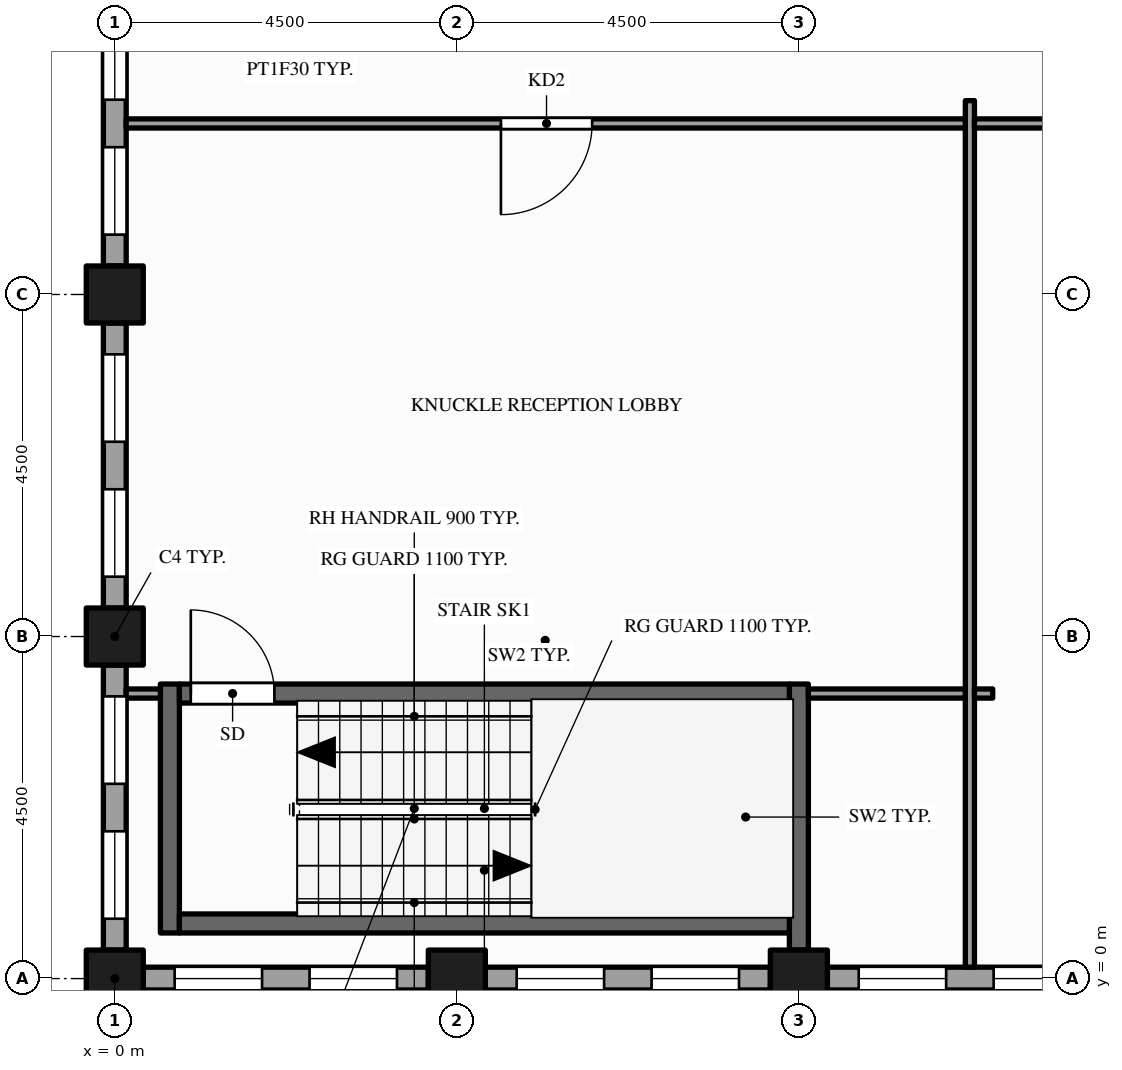
"""IFC4 building model, lengths in metres.
Left out: names, types, materials, properties, quantities, classifications, styles, units other than length and angle.
Written with IfcOpenShell. Run it as: python <this file> out.ifc"""

import sys

from ifc_helpers import new_model, si_unit, direction, frame, frame_2d, origin, origin_2d, place, context, subcontext, project, spatial, rectangle, hollow_rectangle, extrude, element, fill, save


model = new_model("IFC4")
c1 = context("Model", 3, precision=1e-05, world=origin(), true_north=direction((0.0, 1.0)))
c2 = subcontext(c1, "Body", "Model", "MODEL_VIEW")
j1 = project(units=[si_unit("LENGTHUNIT", "METRE"), si_unit("PLANEANGLEUNIT", "RADIAN")], contexts=[c1])
p1 = place(None, origin())
s1 = spatial("IfcSite", under=j1, at=p1, CompositionType="ELEMENT")
p2 = place(p1, origin())
s2 = spatial("IfcBuilding", under=s1, at=p2, CompositionType="ELEMENT")
p3 = place(p2, frame((0.0, 0.0, 239.0)))
s3 = spatial("IfcBuildingStorey", under=s2, at=p3, CompositionType="ELEMENT", Elevation=239.0)
for number, where, z_axis, x_axis in (
    (1, (0.0, 0.0, -0.15), (0.0, 0.0, 1.0), (1.0, 0.0, 0.0)),
    (2, (0.0, 4.5, -0.15), (0.0, 0.0, 1.0), (1.0, 0.0, 0.0)),
    (3, (0.0, 9.0, -0.15), (0.0, 0.0, 1.0), (1.0, 0.0, 0.0)),
    (4, (4.5, 0.0, -0.15), (0.0, 0.0, 1.0), (1.0, 0.0, 0.0)),
    (5, (9.0, 0.0, -0.15), (0.0, 0.0, 1.0), (1.0, 0.0, 0.0)),
):
    element("IfcColumn", number, at=place(p3, frame(where, z_axis=z_axis, x_axis=x_axis)), inside=s3, PredefinedType="COLUMN", context=c2, shape_type="SweptSolid", body=[
        extrude(hollow_rectangle(XDim=0.75, YDim=0.75, WallThickness=0.036, at=origin_2d()), origin(), (0.0, 0.0, 1.0), 3.9),
    ])
p4 = place(p3, frame((0.0, 13.125, 0.0), z_axis=(0.0, 0.0, 1.0), x_axis=(0.0, -1.0, 0.0)))
e6 = element("IfcWall", 6, at=p4, inside=s3, PredefinedType="STANDARD", context=c2, shape_type="SweptSolid", body=[
    extrude(rectangle(XDim=3.75, YDim=0.3, at=frame_2d((1.875, 0.0))), origin(), (0.0, 0.0, 1.0), 3.057),
])
p5 = place(p4, frame((0.413, 0.0, 0.9)))
e7 = element("IfcOpeningElement", 7, at=p5, cuts=e6, PredefinedType="OPENING", context=c2, shape_type="SweptSolid", body=[
    extrude(rectangle(XDim=1.15, YDim=2.0, at=frame_2d((0.575, 1.0))), frame((0.0, 0.16, 0.0), z_axis=(0.0, -1.0, 0.0), x_axis=(1.0, 0.0, 0.0)), (0.0, 0.0, 1.0), 0.32),
])
p6 = place(p4, frame((2.188, 0.0, 0.9)))
e8 = element("IfcOpeningElement", 8, at=p6, cuts=e6, PredefinedType="OPENING", context=c2, shape_type="SweptSolid", body=[
    extrude(rectangle(XDim=1.15, YDim=2.0, at=frame_2d((0.575, 1.0))), frame((0.0, 0.16, 0.0), z_axis=(0.0, -1.0, 0.0), x_axis=(1.0, 0.0, 0.0)), (0.0, 0.0, 1.0), 0.32),
])
p7 = place(p3, frame((0.0, 8.625, 0.0), z_axis=(0.0, 0.0, 1.0), x_axis=(0.0, -1.0, 0.0)))
e9 = element("IfcWall", 9, at=p7, inside=s3, PredefinedType="STANDARD", context=c2, shape_type="SweptSolid", body=[
    extrude(rectangle(XDim=3.75, YDim=0.3, at=frame_2d((1.875, 0.0))), origin(), (0.0, 0.0, 1.0), 3.057),
])
p8 = place(p7, frame((0.413, 0.0, 0.9)))
e10 = element("IfcOpeningElement", 10, at=p8, cuts=e9, PredefinedType="OPENING", context=c2, shape_type="SweptSolid", body=[
    extrude(rectangle(XDim=1.15, YDim=2.0, at=frame_2d((0.575, 1.0))), frame((0.0, 0.16, 0.0), z_axis=(0.0, -1.0, 0.0), x_axis=(1.0, 0.0, 0.0)), (0.0, 0.0, 1.0), 0.32),
])
p9 = place(p7, frame((2.188, 0.0, 0.9)))
e11 = element("IfcOpeningElement", 11, at=p9, cuts=e9, PredefinedType="OPENING", context=c2, shape_type="SweptSolid", body=[
    extrude(rectangle(XDim=1.15, YDim=2.0, at=frame_2d((0.575, 1.0))), frame((0.0, 0.16, 0.0), z_axis=(0.0, -1.0, 0.0), x_axis=(1.0, 0.0, 0.0)), (0.0, 0.0, 1.0), 0.32),
])
p10 = place(p3, frame((0.0, 4.125, 0.0), z_axis=(0.0, 0.0, 1.0), x_axis=(0.0, -1.0, 0.0)))
e12 = element("IfcWall", 12, at=p10, inside=s3, PredefinedType="STANDARD", context=c2, shape_type="SweptSolid", body=[
    extrude(rectangle(XDim=3.75, YDim=0.3, at=frame_2d((1.875, 0.0))), origin(), (0.0, 0.0, 1.0), 3.057),
])
p11 = place(p10, frame((0.413, 0.0, 0.9)))
e13 = element("IfcOpeningElement", 13, at=p11, cuts=e12, PredefinedType="OPENING", context=c2, shape_type="SweptSolid", body=[
    extrude(rectangle(XDim=1.15, YDim=2.0, at=frame_2d((0.575, 1.0))), frame((0.0, 0.16, 0.0), z_axis=(0.0, -1.0, 0.0), x_axis=(1.0, 0.0, 0.0)), (0.0, 0.0, 1.0), 0.32),
])
p12 = place(p10, frame((2.188, 0.0, 0.9)))
e14 = element("IfcOpeningElement", 14, at=p12, cuts=e12, PredefinedType="OPENING", context=c2, shape_type="SweptSolid", body=[
    extrude(rectangle(XDim=1.15, YDim=2.0, at=frame_2d((0.575, 1.0))), frame((0.0, 0.16, 0.0), z_axis=(0.0, -1.0, 0.0), x_axis=(1.0, 0.0, 0.0)), (0.0, 0.0, 1.0), 0.32),
])
p13 = place(p3, frame((0.375, 0.0, 0.0), z_axis=(0.0, 0.0, 1.0), x_axis=(1.0, 0.0, 0.0)))
e15 = element("IfcWall", 15, at=p13, inside=s3, PredefinedType="STANDARD", context=c2, shape_type="SweptSolid", body=[
    extrude(rectangle(XDim=3.75, YDim=0.3, at=frame_2d((1.875, 0.0))), origin(), (0.0, 0.0, 1.0), 3.057),
])
p14 = place(p13, frame((0.413, 0.0, 0.9)))
e16 = element("IfcOpeningElement", 16, at=p14, cuts=e15, PredefinedType="OPENING", context=c2, shape_type="SweptSolid", body=[
    extrude(rectangle(XDim=1.15, YDim=2.0, at=frame_2d((0.575, 1.0))), frame((0.0, 0.16, 0.0), z_axis=(0.0, -1.0, 0.0), x_axis=(1.0, 0.0, 0.0)), (0.0, 0.0, 1.0), 0.32),
])
p15 = place(p13, frame((2.188, 0.0, 0.9)))
e17 = element("IfcOpeningElement", 17, at=p15, cuts=e15, PredefinedType="OPENING", context=c2, shape_type="SweptSolid", body=[
    extrude(rectangle(XDim=1.15, YDim=2.0, at=frame_2d((0.575, 1.0))), frame((0.0, 0.16, 0.0), z_axis=(0.0, -1.0, 0.0), x_axis=(1.0, 0.0, 0.0)), (0.0, 0.0, 1.0), 0.32),
])
p16 = place(p3, frame((4.875, 0.0, 0.0), z_axis=(0.0, 0.0, 1.0), x_axis=(1.0, 0.0, 0.0)))
e18 = element("IfcWall", 18, at=p16, inside=s3, PredefinedType="STANDARD", context=c2, shape_type="SweptSolid", body=[
    extrude(rectangle(XDim=3.75, YDim=0.3, at=frame_2d((1.875, 0.0))), origin(), (0.0, 0.0, 1.0), 3.057),
])
p17 = place(p16, frame((0.413, 0.0, 0.9)))
e19 = element("IfcOpeningElement", 19, at=p17, cuts=e18, PredefinedType="OPENING", context=c2, shape_type="SweptSolid", body=[
    extrude(rectangle(XDim=1.15, YDim=2.0, at=frame_2d((0.575, 1.0))), frame((0.0, 0.16, 0.0), z_axis=(0.0, -1.0, 0.0), x_axis=(1.0, 0.0, 0.0)), (0.0, 0.0, 1.0), 0.32),
])
p18 = place(p16, frame((2.188, 0.0, 0.9)))
e20 = element("IfcOpeningElement", 20, at=p18, cuts=e18, PredefinedType="OPENING", context=c2, shape_type="SweptSolid", body=[
    extrude(rectangle(XDim=1.15, YDim=2.0, at=frame_2d((0.575, 1.0))), frame((0.0, 0.16, 0.0), z_axis=(0.0, -1.0, 0.0), x_axis=(1.0, 0.0, 0.0)), (0.0, 0.0, 1.0), 0.32),
])
p19 = place(p3, frame((9.375, 0.0, 0.0), z_axis=(0.0, 0.0, 1.0), x_axis=(1.0, 0.0, 0.0)))
e21 = element("IfcWall", 21, at=p19, inside=s3, PredefinedType="STANDARD", context=c2, shape_type="SweptSolid", body=[
    extrude(rectangle(XDim=3.75, YDim=0.3, at=frame_2d((1.875, 0.0))), origin(), (0.0, 0.0, 1.0), 3.057),
])
p20 = place(p19, frame((0.413, 0.0, 0.9)))
e22 = element("IfcOpeningElement", 22, at=p20, cuts=e21, PredefinedType="OPENING", context=c2, shape_type="SweptSolid", body=[
    extrude(rectangle(XDim=1.15, YDim=2.0, at=frame_2d((0.575, 1.0))), frame((0.0, 0.16, 0.0), z_axis=(0.0, -1.0, 0.0), x_axis=(1.0, 0.0, 0.0)), (0.0, 0.0, 1.0), 0.32),
])
p21 = place(p19, frame((2.188, 0.0, 0.9)))
e23 = element("IfcOpeningElement", 23, at=p21, cuts=e21, PredefinedType="OPENING", context=c2, shape_type="SweptSolid", body=[
    extrude(rectangle(XDim=1.15, YDim=2.0, at=frame_2d((0.575, 1.0))), frame((0.0, 0.16, 0.0), z_axis=(0.0, -1.0, 0.0), x_axis=(1.0, 0.0, 0.0)), (0.0, 0.0, 1.0), 0.32),
])
p22 = place(p3, frame((0.725, 0.6, 0.0), z_axis=(0.0, 0.0, 1.0), x_axis=(0.0, 1.0, 0.0)))
e24 = element("IfcWall", 24, at=p22, inside=s3, PredefinedType="SHEAR", context=c2, shape_type="SweptSolid", body=[
    extrude(rectangle(XDim=3.275, YDim=0.25, at=frame_2d((1.637, 0.0))), origin(), (0.0, 0.0, 1.0), 3.75),
])
p23 = place(p3, frame((9.0, 0.375, 0.0), z_axis=(0.0, 0.0, 1.0), x_axis=(0.0, 1.0, 0.0)))
e25 = element("IfcWall", 25, at=p23, inside=s3, PredefinedType="SHEAR", context=c2, shape_type="SweptSolid", body=[
    extrude(rectangle(XDim=3.5, YDim=0.25, at=frame_2d((1.75, 0.0))), origin(), (0.0, 0.0, 1.0), 3.75),
])
p24 = place(p3, frame((11.25, 0.15, 0.0), z_axis=(0.0, 0.0, 1.0), x_axis=(0.0, 1.0, 0.0)))
e26 = element("IfcWall", 26, at=p24, inside=s3, PredefinedType="PARTITIONING", context=c2, shape_type="SweptSolid", body=[
    extrude(rectangle(XDim=11.4, YDim=0.12, at=frame_2d((5.7, 0.0))), origin(), (0.0, 0.0, 1.0), 2.77),
])
p25 = place(p3, frame((0.85, 0.725, 0.0), z_axis=(0.0, 0.0, 1.0), x_axis=(1.0, 0.0, 0.0)))
e27 = element("IfcWall", 27, at=p25, inside=s3, PredefinedType="SHEAR", context=c2, shape_type="SweptSolid", body=[
    extrude(rectangle(XDim=8.025, YDim=0.25, at=frame_2d((4.012, 0.0))), origin(), (0.0, 0.0, 1.0), 3.75),
])
p26 = place(p3, frame((0.15, 3.75, 0.0), z_axis=(0.0, 0.0, 1.0), x_axis=(1.0, 0.0, 0.0)))
e28 = element("IfcWall", 28, at=p26, inside=s3, PredefinedType="PARTITIONING", context=c2, shape_type="SweptSolid", body=[
    extrude(rectangle(XDim=0.45, YDim=0.12, at=frame_2d((0.225, 0.0))), origin(), (0.0, 0.0, 1.0), 3.75),
])
p27 = place(p3, frame((0.85, 3.75, 0.0), z_axis=(0.0, 0.0, 1.0), x_axis=(1.0, 0.0, 0.0)))
e29 = element("IfcWall", 29, at=p27, inside=s3, PredefinedType="SHEAR", context=c2, shape_type="SweptSolid", body=[
    extrude(rectangle(XDim=8.025, YDim=0.25, at=frame_2d((4.012, 0.0))), origin(), (0.0, 0.0, 1.0), 3.75),
])
p28 = place(p27, frame((0.15, 0.0, 0.0)))
e30 = element("IfcOpeningElement", 30, at=p28, cuts=e29, PredefinedType="OPENING", context=c2, shape_type="SweptSolid", body=[
    extrude(rectangle(XDim=1.1, YDim=2.1, at=frame_2d((0.55, 1.05))), frame((0.0, 0.135, 0.0), z_axis=(0.0, -1.0, 0.0), x_axis=(1.0, 0.0, 0.0)), (0.0, 0.0, 1.0), 0.27),
])
p29 = place(p3, frame((9.125, 3.75, 0.0), z_axis=(0.0, 0.0, 1.0), x_axis=(1.0, 0.0, 0.0)))
e31 = element("IfcWall", 31, at=p29, inside=s3, PredefinedType="PARTITIONING", context=c2, shape_type="SweptSolid", body=[
    extrude(rectangle(XDim=2.065, YDim=0.12, at=frame_2d((1.032, 0.0))), origin(), (0.0, 0.0, 1.0), 2.77),
])
p30 = place(p3, frame((11.31, 3.75, 0.0), z_axis=(0.0, 0.0, 1.0), x_axis=(1.0, 0.0, 0.0)))
e32 = element("IfcWall", 32, at=p30, inside=s3, PredefinedType="PARTITIONING", context=c2, shape_type="SweptSolid", body=[
    extrude(rectangle(XDim=0.24, YDim=0.12, at=frame_2d((0.12, 0.0))), origin(), (0.0, 0.0, 1.0), 2.77),
])
p31 = place(p3, frame((0.15, 11.25, 0.0), z_axis=(0.0, 0.0, 1.0), x_axis=(1.0, 0.0, 0.0)))
e33 = element("IfcWall", 33, at=p31, inside=s3, PredefinedType="PARTITIONING", context=c2, shape_type="SweptSolid", body=[
    extrude(rectangle(XDim=11.04, YDim=0.12, at=frame_2d((5.52, 0.0))), origin(), (0.0, 0.0, 1.0), 2.77),
])
p32 = place(p31, frame((4.93, 0.0, 0.0)))
e34 = element("IfcOpeningElement", 34, at=p32, cuts=e33, PredefinedType="OPENING", context=c2, shape_type="SweptSolid", body=[
    extrude(rectangle(XDim=1.2, YDim=2.1, at=frame_2d((0.6, 1.05))), frame((0.0, 0.07, 0.0), z_axis=(0.0, -1.0, 0.0), x_axis=(1.0, 0.0, 0.0)), (0.0, 0.0, 1.0), 0.14),
])
p33 = place(p3, frame((11.31, 11.25, 0.0), z_axis=(0.0, 0.0, 1.0), x_axis=(1.0, 0.0, 0.0)))
e35 = element("IfcWall", 35, at=p33, inside=s3, PredefinedType="PARTITIONING", context=c2, shape_type="SweptSolid", body=[
    extrude(rectangle(XDim=4.38, YDim=0.12, at=frame_2d((2.19, 0.0))), origin(), (0.0, 0.0, 1.0), 2.77),
])
p34 = place(p33, frame((1.69, 0.0, 0.0)))
e36 = element("IfcOpeningElement", 36, at=p34, cuts=e35, PredefinedType="OPENING", context=c2, shape_type="SweptSolid", body=[
    extrude(rectangle(XDim=1.0, YDim=2.1, at=frame_2d((0.5, 1.05))), frame((0.0, 0.07, 0.0), z_axis=(0.0, -1.0, 0.0), x_axis=(1.0, 0.0, 0.0)), (0.0, 0.0, 1.0), 0.14),
])
p35 = place(p5, origin())
e37 = element("IfcWindow", 37, at=p35, inside=s3, PartitioningType="SINGLE_PANEL", PredefinedType="WINDOW", context=c2, shape_type="SweptSolid", body=[
    extrude(rectangle(XDim=1.15, YDim=2.0, at=frame_2d((0.575, 1.0))), frame((0.0, 0.03, 0.0), z_axis=(0.0, -1.0, 0.0), x_axis=(1.0, 0.0, 0.0)), (0.0, 0.0, 1.0), 0.06),
])
fill(e7, e37)
p36 = place(p6, origin())
e38 = element("IfcWindow", 38, at=p36, inside=s3, PartitioningType="SINGLE_PANEL", PredefinedType="WINDOW", context=c2, shape_type="SweptSolid", body=[
    extrude(rectangle(XDim=1.15, YDim=2.0, at=frame_2d((0.575, 1.0))), frame((0.0, 0.03, 0.0), z_axis=(0.0, -1.0, 0.0), x_axis=(1.0, 0.0, 0.0)), (0.0, 0.0, 1.0), 0.06),
])
fill(e8, e38)
p37 = place(p8, origin())
e39 = element("IfcWindow", 39, at=p37, inside=s3, PartitioningType="SINGLE_PANEL", PredefinedType="WINDOW", context=c2, shape_type="SweptSolid", body=[
    extrude(rectangle(XDim=1.15, YDim=2.0, at=frame_2d((0.575, 1.0))), frame((0.0, 0.03, 0.0), z_axis=(0.0, -1.0, 0.0), x_axis=(1.0, 0.0, 0.0)), (0.0, 0.0, 1.0), 0.06),
])
fill(e10, e39)
p38 = place(p9, origin())
e40 = element("IfcWindow", 40, at=p38, inside=s3, PartitioningType="SINGLE_PANEL", PredefinedType="WINDOW", context=c2, shape_type="SweptSolid", body=[
    extrude(rectangle(XDim=1.15, YDim=2.0, at=frame_2d((0.575, 1.0))), frame((0.0, 0.03, 0.0), z_axis=(0.0, -1.0, 0.0), x_axis=(1.0, 0.0, 0.0)), (0.0, 0.0, 1.0), 0.06),
])
fill(e11, e40)
p39 = place(p11, origin())
e41 = element("IfcWindow", 41, at=p39, inside=s3, PartitioningType="SINGLE_PANEL", PredefinedType="WINDOW", context=c2, shape_type="SweptSolid", body=[
    extrude(rectangle(XDim=1.15, YDim=2.0, at=frame_2d((0.575, 1.0))), frame((0.0, 0.03, 0.0), z_axis=(0.0, -1.0, 0.0), x_axis=(1.0, 0.0, 0.0)), (0.0, 0.0, 1.0), 0.06),
])
fill(e13, e41)
p40 = place(p12, origin())
e42 = element("IfcWindow", 42, at=p40, inside=s3, PartitioningType="SINGLE_PANEL", PredefinedType="WINDOW", context=c2, shape_type="SweptSolid", body=[
    extrude(rectangle(XDim=1.15, YDim=2.0, at=frame_2d((0.575, 1.0))), frame((0.0, 0.03, 0.0), z_axis=(0.0, -1.0, 0.0), x_axis=(1.0, 0.0, 0.0)), (0.0, 0.0, 1.0), 0.06),
])
fill(e14, e42)
p41 = place(p14, origin())
e43 = element("IfcWindow", 43, at=p41, inside=s3, PartitioningType="SINGLE_PANEL", PredefinedType="WINDOW", context=c2, shape_type="SweptSolid", body=[
    extrude(rectangle(XDim=1.15, YDim=2.0, at=frame_2d((0.575, 1.0))), frame((0.0, 0.03, 0.0), z_axis=(0.0, -1.0, 0.0), x_axis=(1.0, 0.0, 0.0)), (0.0, 0.0, 1.0), 0.06),
])
fill(e16, e43)
p42 = place(p15, origin())
e44 = element("IfcWindow", 44, at=p42, inside=s3, PartitioningType="SINGLE_PANEL", PredefinedType="WINDOW", context=c2, shape_type="SweptSolid", body=[
    extrude(rectangle(XDim=1.15, YDim=2.0, at=frame_2d((0.575, 1.0))), frame((0.0, 0.03, 0.0), z_axis=(0.0, -1.0, 0.0), x_axis=(1.0, 0.0, 0.0)), (0.0, 0.0, 1.0), 0.06),
])
fill(e17, e44)
p43 = place(p17, origin())
e45 = element("IfcWindow", 45, at=p43, inside=s3, PartitioningType="SINGLE_PANEL", PredefinedType="WINDOW", context=c2, shape_type="SweptSolid", body=[
    extrude(rectangle(XDim=1.15, YDim=2.0, at=frame_2d((0.575, 1.0))), frame((0.0, 0.03, 0.0), z_axis=(0.0, -1.0, 0.0), x_axis=(1.0, 0.0, 0.0)), (0.0, 0.0, 1.0), 0.06),
])
fill(e19, e45)
p44 = place(p18, origin())
e46 = element("IfcWindow", 46, at=p44, inside=s3, PartitioningType="SINGLE_PANEL", PredefinedType="WINDOW", context=c2, shape_type="SweptSolid", body=[
    extrude(rectangle(XDim=1.15, YDim=2.0, at=frame_2d((0.575, 1.0))), frame((0.0, 0.03, 0.0), z_axis=(0.0, -1.0, 0.0), x_axis=(1.0, 0.0, 0.0)), (0.0, 0.0, 1.0), 0.06),
])
fill(e20, e46)
p45 = place(p20, origin())
e47 = element("IfcWindow", 47, at=p45, inside=s3, PartitioningType="SINGLE_PANEL", PredefinedType="WINDOW", context=c2, shape_type="SweptSolid", body=[
    extrude(rectangle(XDim=1.15, YDim=2.0, at=frame_2d((0.575, 1.0))), frame((0.0, 0.03, 0.0), z_axis=(0.0, -1.0, 0.0), x_axis=(1.0, 0.0, 0.0)), (0.0, 0.0, 1.0), 0.06),
])
fill(e22, e47)
p46 = place(p21, origin())
e48 = element("IfcWindow", 48, at=p46, inside=s3, PartitioningType="SINGLE_PANEL", PredefinedType="WINDOW", context=c2, shape_type="SweptSolid", body=[
    extrude(rectangle(XDim=1.15, YDim=2.0, at=frame_2d((0.575, 1.0))), frame((0.0, 0.03, 0.0), z_axis=(0.0, -1.0, 0.0), x_axis=(1.0, 0.0, 0.0)), (0.0, 0.0, 1.0), 0.06),
])
fill(e23, e48)
p47 = place(p28, origin())
e49 = element("IfcDoor", 49, at=p47, inside=s3, OperationType="SINGLE_SWING_LEFT", PredefinedType="DOOR", context=c2, shape_type="SweptSolid", body=[
    extrude(rectangle(XDim=1.1, YDim=2.1, at=frame_2d((0.55, 1.05))), frame((0.0, 0.025, 0.0), z_axis=(0.0, -1.0, 0.0), x_axis=(1.0, 0.0, 0.0)), (0.0, 0.0, 1.0), 0.05),
])
fill(e30, e49)
p48 = place(p32, origin())
e50 = element("IfcDoor", 50, at=p48, inside=s3, OperationType="SINGLE_SWING_LEFT", PredefinedType="DOOR", context=c2, shape_type="SweptSolid", body=[
    extrude(rectangle(XDim=1.2, YDim=2.1, at=frame_2d((0.6, 1.05))), frame((0.0, 0.025, 0.0), z_axis=(0.0, -1.0, 0.0), x_axis=(1.0, 0.0, 0.0)), (0.0, 0.0, 1.0), 0.05),
])
fill(e34, e50)
save(model, sys.argv[1])
